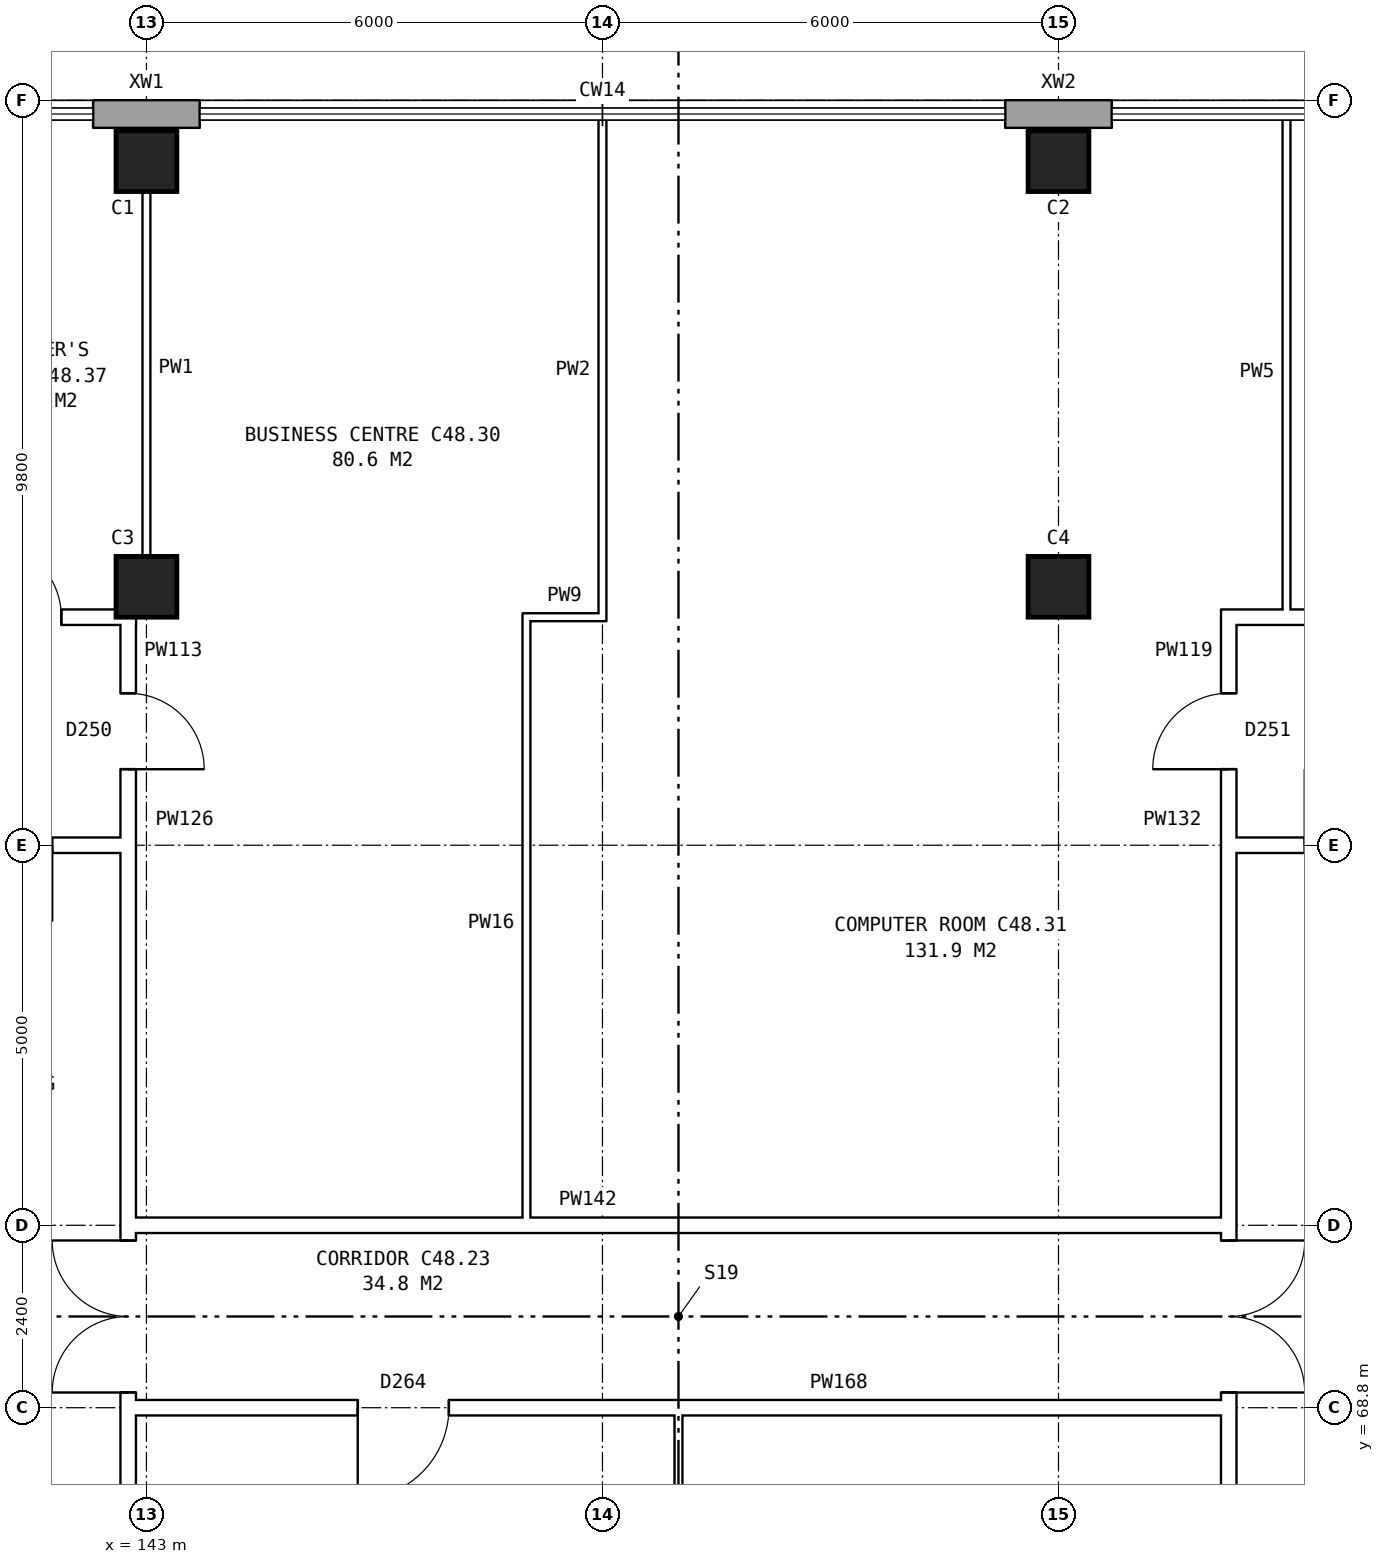
"""IFC4 building model, lengths in metres.
Left out: names, types, materials, properties, quantities, classifications, styles, units other than length and angle.
Written with IfcOpenShell. Run it as: python <this file> out.ifc"""

import sys

from ifc_helpers import new_model, si_unit, direction, frame, frame_2d, origin, origin_2d, place, context, subcontext, project, spatial, rectangle, extrude, element, fill, save


model = new_model("IFC4")
c1 = context("Model", 3, precision=1e-05, world=origin(), true_north=direction((0.0, 1.0)))
c2 = subcontext(c1, "Body", "Model", "MODEL_VIEW")
j1 = project(units=[si_unit("LENGTHUNIT", "METRE"), si_unit("PLANEANGLEUNIT", "RADIAN")], contexts=[c1])
p1 = place(None, origin())
s1 = spatial("IfcSite", under=j1, at=p1, CompositionType="ELEMENT")
p2 = place(p1, origin())
s2 = spatial("IfcBuilding", under=s1, at=p2, CompositionType="ELEMENT")
p3 = place(p2, frame((0.0, 0.0, 171.6)))
s3 = spatial("IfcBuildingStorey", under=s2, at=p3, CompositionType="ELEMENT", Elevation=171.6)
for number, where, z_axis, x_axis in (
    (1, (143.0, 79.6, 0.0), (0.0, 0.0, 1.0), (1.0, 0.0, 0.0)),
    (2, (143.0, 85.2, 0.0), (0.0, 0.0, 1.0), (1.0, 0.0, 0.0)),
    (3, (155.0, 79.6, 0.0), (0.0, 0.0, 1.0), (1.0, 0.0, 0.0)),
    (4, (155.0, 85.2, 0.0), (0.0, 0.0, 1.0), (1.0, 0.0, 0.0)),
):
    element("IfcColumn", number, at=place(p3, frame(where, z_axis=z_axis, x_axis=x_axis)), inside=s3, PredefinedType="COLUMN", context=c2, shape_type="SweptSolid", body=[
        extrude(rectangle(XDim=0.8, YDim=0.8, at=origin_2d()), origin(), (0.0, 0.0, 1.0), 3.6),
    ])
for number, where, z_axis, x_axis in (
    (5, (155.7, 85.82, 0.0), (0.0, 0.0, 1.0), (-1.0, 0.0, 0.0)),
    (6, (143.7, 85.82, 0.0), (0.0, 0.0, 1.0), (-1.0, 0.0, 0.0)),
):
    element("IfcWall", number, at=place(p3, frame(where, z_axis=z_axis, x_axis=x_axis)), inside=s3, PredefinedType="STANDARD", context=c2, shape_type="SweptSolid", body=[
        extrude(rectangle(XDim=1.4, YDim=0.36, at=frame_2d((0.7, 0.0))), origin(), (0.0, 0.0, 1.0), 3.6),
    ])
p4 = place(p3, frame((142.76, 63.9, 0.0), z_axis=(0.0, 0.0, 1.0), x_axis=(0.0, 1.0, 0.0)))
e7 = element("IfcWall", 7, at=p4, inside=s3, PredefinedType="PARTITIONING", context=c2, shape_type="SweptSolid", body=[
    extrude(rectangle(XDim=12.2, YDim=0.2, at=frame_2d((6.1, 0.0))), origin(), (0.0, 0.0, 1.0), 3.6),
])
p5 = place(p4, frame((5.1, 0.0, 0.0)))
e8 = element("IfcOpeningElement", 8, at=p5, cuts=e7, PredefinedType="OPENING", context=c2, shape_type="SweptSolid", body=[
    extrude(rectangle(XDim=2.0, YDim=2.1, at=frame_2d((1.0, 1.05))), frame((0.0, 0.11, 0.0), z_axis=(0.0, -1.0, 0.0), x_axis=(1.0, 0.0, 0.0)), (0.0, 0.0, 1.0), 0.22),
])
p6 = place(p3, frame((157.24, 63.9, 0.0), z_axis=(0.0, 0.0, 1.0), x_axis=(0.0, 1.0, 0.0)))
e9 = element("IfcWall", 9, at=p6, inside=s3, PredefinedType="PARTITIONING", context=c2, shape_type="SweptSolid", body=[
    extrude(rectangle(XDim=12.2, YDim=0.2, at=frame_2d((6.1, 0.0))), origin(), (0.0, 0.0, 1.0), 3.6),
])
p7 = place(p6, frame((5.1, 0.0, 0.0)))
e10 = element("IfcOpeningElement", 10, at=p7, cuts=e9, PredefinedType="OPENING", context=c2, shape_type="SweptSolid", body=[
    extrude(rectangle(XDim=2.0, YDim=2.1, at=frame_2d((1.0, 1.05))), frame((0.0, 0.11, 0.0), z_axis=(0.0, -1.0, 0.0), x_axis=(1.0, 0.0, 0.0)), (0.0, 0.0, 1.0), 0.22),
])
p8 = place(p3, frame((142.76, 68.8, 0.0), z_axis=(0.0, 0.0, 1.0), x_axis=(1.0, 0.0, 0.0)))
e11 = element("IfcWall", 11, at=p8, inside=s3, PredefinedType="PARTITIONING", context=c2, shape_type="SweptSolid", body=[
    extrude(rectangle(XDim=14.48, YDim=0.2, at=frame_2d((7.24, 0.0))), origin(), (0.0, 0.0, 1.0), 3.6),
])
p9 = place(p8, frame((3.02, 0.0, 0.0)))
e12 = element("IfcOpeningElement", 12, at=p9, cuts=e11, PredefinedType="OPENING", context=c2, shape_type="SweptSolid", body=[
    extrude(rectangle(XDim=1.2, YDim=2.1, at=frame_2d((0.6, 1.05))), frame((0.0, 0.11, 0.0), z_axis=(0.0, -1.0, 0.0), x_axis=(1.0, 0.0, 0.0)), (0.0, 0.0, 1.0), 0.22),
])
p10 = place(p3, frame((142.76, 71.2, 0.0), z_axis=(0.0, 0.0, 1.0), x_axis=(1.0, 0.0, 0.0)))
e13 = element("IfcWall", 13, at=p10, inside=s3, PredefinedType="PARTITIONING", context=c2, shape_type="SweptSolid", body=[
    extrude(rectangle(XDim=14.48, YDim=0.2, at=frame_2d((7.24, 0.0))), origin(), (0.0, 0.0, 1.0), 3.6),
])
p11 = place(p3, frame((139.76, 76.2, 0.0), z_axis=(0.0, 0.0, 1.0), x_axis=(1.0, 0.0, 0.0)))
e14 = element("IfcWall", 14, at=p11, inside=s3, PredefinedType="PARTITIONING", context=c2, shape_type="SweptSolid", body=[
    extrude(rectangle(XDim=3.1, YDim=0.2, at=frame_2d((1.55, 0.0))), origin(), (0.0, 0.0, 1.0), 3.6),
])
p12 = place(p11, frame((1.0, 0.0, 0.0)))
e15 = element("IfcOpeningElement", 15, at=p12, cuts=e14, PredefinedType="OPENING", context=c2, shape_type="SweptSolid", body=[
    extrude(rectangle(XDim=1.0, YDim=2.1, at=frame_2d((0.5, 1.05))), frame((0.0, 0.11, 0.0), z_axis=(0.0, -1.0, 0.0), x_axis=(1.0, 0.0, 0.0)), (0.0, 0.0, 1.0), 0.22),
])
p13 = place(p3, frame((157.14, 76.2, 0.0), z_axis=(0.0, 0.0, 1.0), x_axis=(1.0, 0.0, 0.0)))
e16 = element("IfcWall", 16, at=p13, inside=s3, PredefinedType="PARTITIONING", context=c2, shape_type="SweptSolid", body=[
    extrude(rectangle(XDim=3.1, YDim=0.2, at=frame_2d((1.55, 0.0))), origin(), (0.0, 0.0, 1.0), 3.6),
])
p14 = place(p13, frame((1.1, 0.0, 0.0)))
e17 = element("IfcOpeningElement", 17, at=p14, cuts=e16, PredefinedType="OPENING", context=c2, shape_type="SweptSolid", body=[
    extrude(rectangle(XDim=1.0, YDim=2.1, at=frame_2d((0.5, 1.05))), frame((0.0, 0.11, 0.0), z_axis=(0.0, -1.0, 0.0), x_axis=(1.0, 0.0, 0.0)), (0.0, 0.0, 1.0), 0.22),
])
p15 = place(p3, frame((131.24, 79.2, 0.0), z_axis=(0.0, 0.0, 1.0), x_axis=(1.0, 0.0, 0.0)))
e18 = element("IfcWall", 18, at=p15, inside=s3, PredefinedType="PARTITIONING", context=c2, shape_type="SweptSolid", body=[
    extrude(rectangle(XDim=11.622, YDim=0.2, at=frame_2d((5.811, 0.0))), origin(), (0.0, 0.0, 1.0), 3.6),
])
p16 = place(p15, frame((0.99, 0.0, 0.0)))
e19 = element("IfcOpeningElement", 19, at=p16, cuts=e18, PredefinedType="OPENING", context=c2, shape_type="SweptSolid", body=[
    extrude(rectangle(XDim=0.9, YDim=2.1, at=frame_2d((0.45, 1.05))), frame((0.0, 0.11, 0.0), z_axis=(0.0, -1.0, 0.0), x_axis=(1.0, 0.0, 0.0)), (0.0, 0.0, 1.0), 0.22),
])
p17 = place(p15, frame((3.81, 0.0, 0.0)))
e20 = element("IfcOpeningElement", 20, at=p17, cuts=e18, PredefinedType="OPENING", context=c2, shape_type="SweptSolid", body=[
    extrude(rectangle(XDim=0.9, YDim=2.1, at=frame_2d((0.45, 1.05))), frame((0.0, 0.11, 0.0), z_axis=(0.0, -1.0, 0.0), x_axis=(1.0, 0.0, 0.0)), (0.0, 0.0, 1.0), 0.22),
])
p18 = place(p15, frame((6.81, 0.0, 0.0)))
e21 = element("IfcOpeningElement", 21, at=p18, cuts=e18, PredefinedType="OPENING", context=c2, shape_type="SweptSolid", body=[
    extrude(rectangle(XDim=0.9, YDim=2.1, at=frame_2d((0.45, 1.05))), frame((0.0, 0.11, 0.0), z_axis=(0.0, -1.0, 0.0), x_axis=(1.0, 0.0, 0.0)), (0.0, 0.0, 1.0), 0.22),
])
p19 = place(p15, frame((9.641, 0.0, 0.0)))
e22 = element("IfcOpeningElement", 22, at=p19, cuts=e18, PredefinedType="OPENING", context=c2, shape_type="SweptSolid", body=[
    extrude(rectangle(XDim=1.0, YDim=2.1, at=frame_2d((0.5, 1.05))), frame((0.0, 0.11, 0.0), z_axis=(0.0, -1.0, 0.0), x_axis=(1.0, 0.0, 0.0)), (0.0, 0.0, 1.0), 0.22),
])
p20 = place(p3, frame((157.14, 79.2, 0.0), z_axis=(0.0, 0.0, 1.0), x_axis=(1.0, 0.0, 0.0)))
e23 = element("IfcWall", 23, at=p20, inside=s3, PredefinedType="PARTITIONING", context=c2, shape_type="SweptSolid", body=[
    extrude(rectangle(XDim=6.96, YDim=0.2, at=frame_2d((3.48, 0.0))), origin(), (0.0, 0.0, 1.0), 3.6),
])
p21 = place(p20, frame((3.36, 0.0, 0.0)))
e24 = element("IfcOpeningElement", 24, at=p21, cuts=e23, PredefinedType="OPENING", context=c2, shape_type="SweptSolid", body=[
    extrude(rectangle(XDim=1.0, YDim=2.1, at=frame_2d((0.5, 1.05))), frame((0.0, 0.11, 0.0), z_axis=(0.0, -1.0, 0.0), x_axis=(1.0, 0.0, 0.0)), (0.0, 0.0, 1.0), 0.22),
])
p22 = place(p3, frame((147.95, 79.2, 0.0), z_axis=(0.0, 0.0, 1.0), x_axis=(1.0, 0.0, 0.0)))
e25 = element("IfcWall", 25, at=p22, inside=s3, PredefinedType="PARTITIONING", context=c2, shape_type="SweptSolid", body=[
    extrude(rectangle(XDim=1.1, YDim=0.1, at=frame_2d((0.55, 0.0))), origin(), (0.0, 0.0, 1.0), 3.6),
])
p23 = place(p3, frame((142.76, 76.1, 0.0), z_axis=(0.0, 0.0, 1.0), x_axis=(0.0, 1.0, 0.0)))
e26 = element("IfcWall", 26, at=p23, inside=s3, PredefinedType="PARTITIONING", context=c2, shape_type="SweptSolid", body=[
    extrude(rectangle(XDim=3.2, YDim=0.2, at=frame_2d((1.6, 0.0))), origin(), (0.0, 0.0, 1.0), 3.6),
])
p24 = place(p23, frame((1.1, 0.0, 0.0)))
e27 = element("IfcOpeningElement", 27, at=p24, cuts=e26, PredefinedType="OPENING", context=c2, shape_type="SweptSolid", body=[
    extrude(rectangle(XDim=1.0, YDim=2.1, at=frame_2d((0.5, 1.05))), frame((0.0, 0.11, 0.0), z_axis=(0.0, -1.0, 0.0), x_axis=(1.0, 0.0, 0.0)), (0.0, 0.0, 1.0), 0.22),
])
p25 = place(p3, frame((143.0, 79.2, 0.0), z_axis=(0.0, 0.0, 1.0), x_axis=(0.0, 1.0, 0.0)))
e28 = element("IfcWall", 28, at=p25, inside=s3, PredefinedType="PARTITIONING", context=c2, shape_type="SweptSolid", body=[
    extrude(rectangle(XDim=6.56, YDim=0.1, at=frame_2d((3.28, 0.0))), origin(), (0.0, 0.0, 1.0), 3.6),
])
p26 = place(p3, frame((148.0, 71.1, 0.0), z_axis=(0.0, 0.0, 1.0), x_axis=(0.0, 1.0, 0.0)))
e29 = element("IfcWall", 29, at=p26, inside=s3, PredefinedType="PARTITIONING", context=c2, shape_type="SweptSolid", body=[
    extrude(rectangle(XDim=8.15, YDim=0.1, at=frame_2d((4.075, 0.0))), origin(), (0.0, 0.0, 1.0), 3.6),
])
p27 = place(p3, frame((149.0, 79.15, 0.0), z_axis=(0.0, 0.0, 1.0), x_axis=(0.0, 1.0, 0.0)))
e30 = element("IfcWall", 30, at=p27, inside=s3, PredefinedType="PARTITIONING", context=c2, shape_type="SweptSolid", body=[
    extrude(rectangle(XDim=6.61, YDim=0.1, at=frame_2d((3.305, 0.0))), origin(), (0.0, 0.0, 1.0), 3.6),
])
p28 = place(p3, frame((150.0, 60.75, 0.0), z_axis=(0.0, 0.0, 1.0), x_axis=(0.0, 1.0, 0.0)))
e31 = element("IfcWall", 31, at=p28, inside=s3, PredefinedType="PARTITIONING", context=c2, shape_type="SweptSolid", body=[
    extrude(rectangle(XDim=8.15, YDim=0.1, at=frame_2d((4.075, 0.0))), origin(), (0.0, 0.0, 1.0), 3.6),
])
p29 = place(p3, frame((157.24, 76.1, 0.0), z_axis=(0.0, 0.0, 1.0), x_axis=(0.0, 1.0, 0.0)))
e32 = element("IfcWall", 32, at=p29, inside=s3, PredefinedType="PARTITIONING", context=c2, shape_type="SweptSolid", body=[
    extrude(rectangle(XDim=3.2, YDim=0.2, at=frame_2d((1.6, 0.0))), origin(), (0.0, 0.0, 1.0), 3.6),
])
p30 = place(p29, frame((1.1, 0.0, 0.0)))
e33 = element("IfcOpeningElement", 33, at=p30, cuts=e32, PredefinedType="OPENING", context=c2, shape_type="SweptSolid", body=[
    extrude(rectangle(XDim=1.0, YDim=2.1, at=frame_2d((0.5, 1.05))), frame((0.0, 0.11, 0.0), z_axis=(0.0, -1.0, 0.0), x_axis=(1.0, 0.0, 0.0)), (0.0, 0.0, 1.0), 0.22),
])
p31 = place(p3, frame((158.0, 79.1, 0.0), z_axis=(0.0, 0.0, 1.0), x_axis=(0.0, 1.0, 0.0)))
e34 = element("IfcWall", 34, at=p31, inside=s3, PredefinedType="PARTITIONING", context=c2, shape_type="SweptSolid", body=[
    extrude(rectangle(XDim=6.66, YDim=0.1, at=frame_2d((3.33, 0.0))), origin(), (0.0, 0.0, 1.0), 3.6),
])
p32 = place(p5, origin())
e35 = element("IfcDoor", 35, at=p32, inside=s3, OperationType="DOUBLE_DOOR_SINGLE_SWING", PredefinedType="DOOR", context=c2, shape_type="SweptSolid", body=[
    extrude(rectangle(XDim=2.0, YDim=2.1, at=frame_2d((1.0, 1.05))), frame((0.0, 0.025, 0.0), z_axis=(0.0, -1.0, 0.0), x_axis=(1.0, 0.0, 0.0)), (0.0, 0.0, 1.0), 0.05),
])
fill(e8, e35)
p33 = place(p7, frame((2.0, 0.0, 0.0), z_axis=(0.0, 0.0, 1.0), x_axis=(-1.0, 0.0, 0.0)))
e36 = element("IfcDoor", 36, at=p33, inside=s3, OperationType="DOUBLE_DOOR_SINGLE_SWING", PredefinedType="DOOR", context=c2, shape_type="SweptSolid", body=[
    extrude(rectangle(XDim=2.0, YDim=2.1, at=frame_2d((1.0, 1.05))), frame((0.0, 0.025, 0.0), z_axis=(0.0, -1.0, 0.0), x_axis=(1.0, 0.0, 0.0)), (0.0, 0.0, 1.0), 0.05),
])
fill(e10, e36)
p34 = place(p9, frame((1.2, 0.0, 0.0), z_axis=(0.0, 0.0, 1.0), x_axis=(-1.0, 0.0, 0.0)))
e37 = element("IfcDoor", 37, at=p34, inside=s3, OperationType="SINGLE_SWING_RIGHT", PredefinedType="DOOR", context=c2, shape_type="SweptSolid", body=[
    extrude(rectangle(XDim=1.2, YDim=2.1, at=frame_2d((0.6, 1.05))), frame((0.0, 0.025, 0.0), z_axis=(0.0, -1.0, 0.0), x_axis=(1.0, 0.0, 0.0)), (0.0, 0.0, 1.0), 0.05),
])
fill(e12, e37)
p35 = place(p19, origin())
e38 = element("IfcDoor", 38, at=p35, inside=s3, OperationType="SINGLE_SWING_LEFT", PredefinedType="DOOR", context=c2, shape_type="SweptSolid", body=[
    extrude(rectangle(XDim=1.0, YDim=2.1, at=frame_2d((0.5, 1.05))), frame((0.0, 0.025, 0.0), z_axis=(0.0, -1.0, 0.0), x_axis=(1.0, 0.0, 0.0)), (0.0, 0.0, 1.0), 0.05),
])
fill(e22, e38)
p36 = place(p24, frame((1.0, 0.0, 0.0), z_axis=(0.0, 0.0, 1.0), x_axis=(-1.0, 0.0, 0.0)))
e39 = element("IfcDoor", 39, at=p36, inside=s3, OperationType="SINGLE_SWING_RIGHT", PredefinedType="DOOR", context=c2, shape_type="SweptSolid", body=[
    extrude(rectangle(XDim=1.0, YDim=2.1, at=frame_2d((0.5, 1.05))), frame((0.0, 0.025, 0.0), z_axis=(0.0, -1.0, 0.0), x_axis=(1.0, 0.0, 0.0)), (0.0, 0.0, 1.0), 0.05),
])
fill(e27, e39)
p37 = place(p30, origin())
e40 = element("IfcDoor", 40, at=p37, inside=s3, OperationType="SINGLE_SWING_LEFT", PredefinedType="DOOR", context=c2, shape_type="SweptSolid", body=[
    extrude(rectangle(XDim=1.0, YDim=2.1, at=frame_2d((0.5, 1.05))), frame((0.0, 0.025, 0.0), z_axis=(0.0, -1.0, 0.0), x_axis=(1.0, 0.0, 0.0)), (0.0, 0.0, 1.0), 0.05),
])
fill(e33, e40)
save(model, sys.argv[1])
